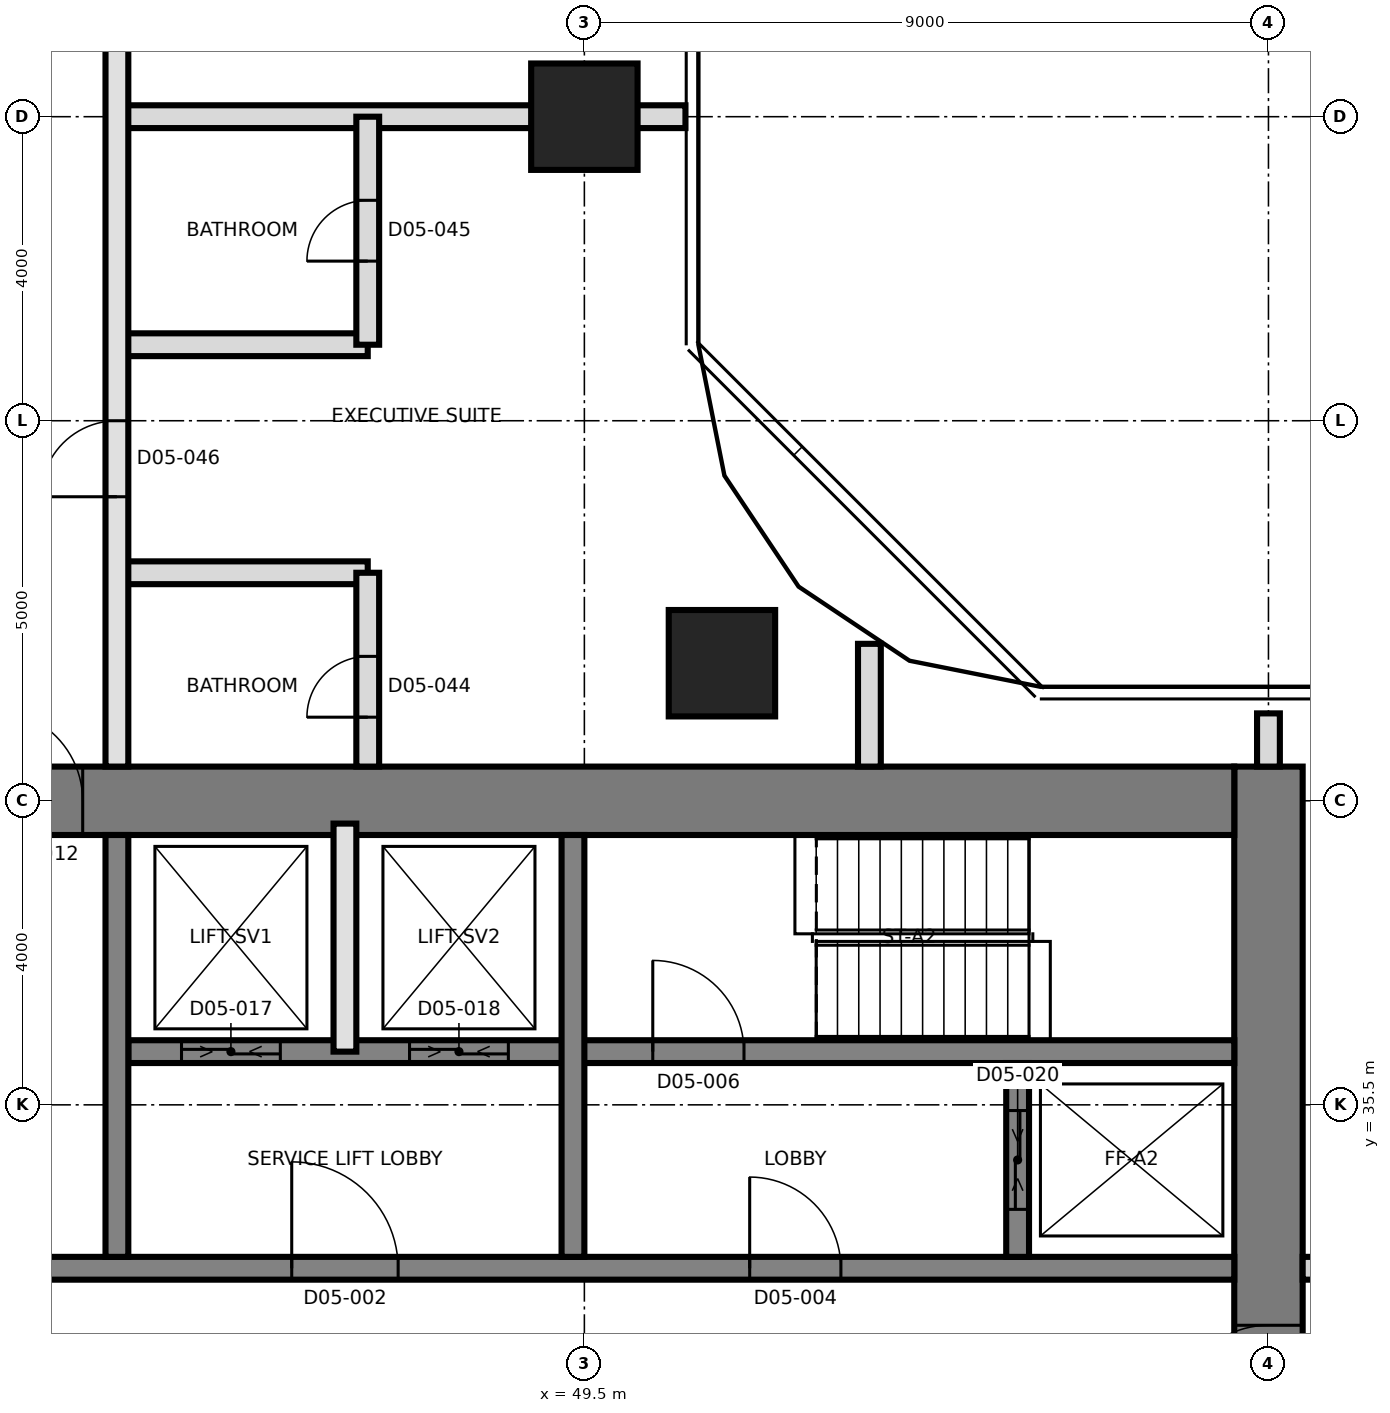
"""IFC4 building model, lengths in metres.
Left out: names, types, materials, properties, quantities, classifications, styles, units other than length and angle.
Written with IfcOpenShell. Run it as: python <this file> out.ifc"""

import sys

from ifc_helpers import new_model, si_unit, direction, frame, frame_2d, origin, origin_2d, place, context, subcontext, project, spatial, rectangle, extrude, element, fill, save


model = new_model("IFC4")
c1 = context("Model", 3, precision=1e-05, world=origin(), true_north=direction((0.0, 1.0)))
c2 = subcontext(c1, "Body", "Model", "MODEL_VIEW")
j1 = project(units=[si_unit("LENGTHUNIT", "METRE"), si_unit("PLANEANGLEUNIT", "RADIAN")], contexts=[c1])
p1 = place(None, origin())
s1 = spatial("IfcSite", under=j1, at=p1, CompositionType="ELEMENT")
p2 = place(p1, origin())
s2 = spatial("IfcBuilding", under=s1, at=p2, CompositionType="ELEMENT")
p3 = place(p2, frame((0.0, 0.0, 74.2)))
s3 = spatial("IfcBuildingStorey", under=s2, at=p3, CompositionType="ELEMENT", Elevation=74.2)
p4 = place(p3, frame((58.5, 21.05, 0.0), z_axis=(0.0, 0.0, 1.0), x_axis=(0.0, 1.0, 0.0)))
e1 = element("IfcWall", 1, at=p4, inside=s3, PredefinedType="SHEAR", context=c2, shape_type="SweptSolid", body=[
    extrude(rectangle(XDim=18.9, YDim=0.9, at=frame_2d((9.45, 0.0))), origin(), (0.0, 0.0, 1.0), 3.7),
])
p5 = place(p4, frame((10.35, 0.0, 0.0)))
e2 = element("IfcOpeningElement", 2, at=p5, cuts=e1, PredefinedType="OPENING", context=c2, shape_type="SweptSolid", body=[
    extrude(rectangle(XDim=1.2, YDim=2.1, at=frame_2d((0.6, 1.05))), frame((0.0, 0.46, 0.0), z_axis=(0.0, -1.0, 0.0), x_axis=(1.0, 0.0, 0.0)), (0.0, 0.0, 1.0), 0.92),
])
p6 = place(p3, frame((31.05, 39.5, 0.0), z_axis=(0.0, 0.0, 1.0), x_axis=(1.0, 0.0, 0.0)))
e3 = element("IfcWall", 3, at=p6, inside=s3, PredefinedType="SHEAR", context=c2, shape_type="SweptSolid", body=[
    extrude(rectangle(XDim=27.0, YDim=0.9, at=frame_2d((13.5, 0.0))), origin(), (0.0, 0.0, 1.0), 3.7),
])
p7 = place(p6, frame((10.65, 0.0, 0.0)))
e4 = element("IfcOpeningElement", 4, at=p7, cuts=e3, PredefinedType="OPENING", context=c2, shape_type="SweptSolid", body=[
    extrude(rectangle(XDim=1.2, YDim=2.1, at=frame_2d((0.6, 1.05))), frame((0.0, 0.46, 0.0), z_axis=(0.0, -1.0, 0.0), x_axis=(1.0, 0.0, 0.0)), (0.0, 0.0, 1.0), 0.92),
])
p8 = place(p3, frame((31.95, 33.35, 0.0), z_axis=(0.0, 0.0, 1.0), x_axis=(1.0, 0.0, 0.0)))
e5 = element("IfcWall", 5, at=p8, inside=s3, PredefinedType="SHEAR", context=c2, shape_type="SweptSolid", body=[
    extrude(rectangle(XDim=26.1, YDim=0.3, at=frame_2d((13.05, 0.0))), origin(), (0.0, 0.0, 1.0), 3.7),
])
p9 = place(p8, frame((13.7, 0.0, 0.0)))
e6 = element("IfcOpeningElement", 6, at=p9, cuts=e5, PredefinedType="OPENING", context=c2, shape_type="SweptSolid", body=[
    extrude(rectangle(XDim=1.4, YDim=2.1, at=frame_2d((0.7, 1.05))), frame((0.0, 0.16, 0.0), z_axis=(0.0, -1.0, 0.0), x_axis=(1.0, 0.0, 0.0)), (0.0, 0.0, 1.0), 0.32),
])
p10 = place(p8, frame((5.175, 0.0, 0.0)))
e7 = element("IfcOpeningElement", 7, at=p10, cuts=e5, PredefinedType="OPENING", context=c2, shape_type="SweptSolid", body=[
    extrude(rectangle(XDim=1.2, YDim=2.1, at=frame_2d((0.6, 1.05))), frame((0.0, 0.16, 0.0), z_axis=(0.0, -1.0, 0.0), x_axis=(1.0, 0.0, 0.0)), (0.0, 0.0, 1.0), 0.32),
])
p11 = place(p8, frame((19.725, 0.0, 0.0)))
e8 = element("IfcOpeningElement", 8, at=p11, cuts=e5, PredefinedType="OPENING", context=c2, shape_type="SweptSolid", body=[
    extrude(rectangle(XDim=1.2, YDim=2.1, at=frame_2d((0.6, 1.05))), frame((0.0, 0.16, 0.0), z_axis=(0.0, -1.0, 0.0), x_axis=(1.0, 0.0, 0.0)), (0.0, 0.0, 1.0), 0.32),
])
p12 = place(p3, frame((43.5, 36.2, 0.0), z_axis=(0.0, 0.0, 1.0), x_axis=(1.0, 0.0, 0.0)))
e9 = element("IfcWall", 9, at=p12, inside=s3, PredefinedType="SHEAR", context=c2, shape_type="SweptSolid", body=[
    extrude(rectangle(XDim=14.55, YDim=0.3, at=frame_2d((7.275, 0.0))), origin(), (0.0, 0.0, 1.0), 3.7),
])
p13 = place(p12, frame((6.9, 0.0, 0.0)))
e10 = element("IfcOpeningElement", 10, at=p13, cuts=e9, PredefinedType="OPENING", context=c2, shape_type="SweptSolid", body=[
    extrude(rectangle(XDim=1.2, YDim=2.1, at=frame_2d((0.6, 1.05))), frame((0.0, 0.16, 0.0), z_axis=(0.0, -1.0, 0.0), x_axis=(1.0, 0.0, 0.0)), (0.0, 0.0, 1.0), 0.32),
])
p14 = place(p12, frame((0.7, 0.0, 0.0)))
e11 = element("IfcOpeningElement", 11, at=p14, cuts=e9, PredefinedType="OPENING", context=c2, shape_type="SweptSolid", body=[
    extrude(rectangle(XDim=1.3, YDim=2.4, at=frame_2d((0.65, 1.2))), frame((0.0, 0.16, 0.0), z_axis=(0.0, -1.0, 0.0), x_axis=(1.0, 0.0, 0.0)), (0.0, 0.0, 1.0), 0.32),
])
p15 = place(p12, frame((3.7, 0.0, 0.0)))
e12 = element("IfcOpeningElement", 12, at=p15, cuts=e9, PredefinedType="OPENING", context=c2, shape_type="SweptSolid", body=[
    extrude(rectangle(XDim=1.3, YDim=2.4, at=frame_2d((0.65, 1.2))), frame((0.0, 0.16, 0.0), z_axis=(0.0, -1.0, 0.0), x_axis=(1.0, 0.0, 0.0)), (0.0, 0.0, 1.0), 0.32),
])
for number, where, z_axis, x_axis in (
    (13, (43.35, 33.5, 0.0), (0.0, 0.0, 1.0), (0.0, 1.0, 0.0)),
    (14, (49.35, 33.5, 0.0), (0.0, 0.0, 1.0), (0.0, 1.0, 0.0)),
):
    element("IfcWall", number, at=place(p3, frame(where, z_axis=z_axis, x_axis=x_axis)), inside=s3, PredefinedType="SHEAR", context=c2, shape_type="SweptSolid", body=[
        extrude(rectangle(XDim=5.55, YDim=0.3, at=frame_2d((2.775, 0.0))), origin(), (0.0, 0.0, 1.0), 3.7),
    ])
p16 = place(p3, frame((55.2, 33.5, 0.0), z_axis=(0.0, 0.0, 1.0), x_axis=(0.0, 1.0, 0.0)))
e15 = element("IfcWall", 15, at=p16, inside=s3, PredefinedType="SHEAR", context=c2, shape_type="SweptSolid", body=[
    extrude(rectangle(XDim=2.55, YDim=0.3, at=frame_2d((1.275, 0.0))), origin(), (0.0, 0.0, 1.0), 3.7),
])
p17 = place(p16, frame((0.625, 0.0, 0.0)))
e16 = element("IfcOpeningElement", 16, at=p17, cuts=e15, PredefinedType="OPENING", context=c2, shape_type="SweptSolid", body=[
    extrude(rectangle(XDim=1.3, YDim=2.4, at=frame_2d((0.65, 1.2))), frame((0.0, 0.16, 0.0), z_axis=(0.0, -1.0, 0.0), x_axis=(1.0, 0.0, 0.0)), (0.0, 0.0, 1.0), 0.32),
])
for number, where, z_axis, x_axis in (
    (17, (51.31, 41.31, 0.0), (0.0, 0.0, 1.0), (1.0, 0.0, 0.0)),
    (18, (49.5, 48.5, 0.0), (0.0, 0.0, 1.0), (1.0, 0.0, 0.0)),
):
    element("IfcColumn", number, at=place(p3, frame(where, z_axis=z_axis, x_axis=x_axis)), inside=s3, PredefinedType="COLUMN", context=c2, shape_type="SweptSolid", body=[
        extrude(rectangle(XDim=1.4, YDim=1.4, at=origin_2d()), origin(), (0.0, 0.0, 1.0), 3.7),
    ])
p18 = place(p3, frame((46.35, 36.2, 0.0), z_axis=(0.0, 0.0, 1.0), x_axis=(0.0, 1.0, 0.0)))
e19 = element("IfcWall", 19, at=p18, inside=s3, PredefinedType="SOLIDWALL", context=c2, shape_type="SweptSolid", body=[
    extrude(rectangle(XDim=3.0, YDim=0.3, at=frame_2d((1.5, 0.0))), origin(), (0.0, 0.0, 1.0), 3.4),
])
p19 = place(p3, frame((58.95, 33.35, 0.0), z_axis=(0.0, 0.0, 1.0), x_axis=(1.0, 0.0, 0.0)))
e20 = element("IfcWall", 20, at=p19, inside=s3, PredefinedType="PARTITIONING", context=c2, shape_type="SweptSolid", body=[
    extrude(rectangle(XDim=26.38, YDim=0.3, at=frame_2d((13.19, 0.0))), origin(), (0.0, 0.0, 1.0), 3.4),
])
p20 = place(p19, frame((0.685, 0.0, 0.0)))
e21 = element("IfcOpeningElement", 21, at=p20, cuts=e20, PredefinedType="OPENING", context=c2, shape_type="SweptSolid", body=[
    extrude(rectangle(XDim=1.2, YDim=2.1, at=frame_2d((0.6, 1.05))), frame((0.0, 0.16, 0.0), z_axis=(0.0, -1.0, 0.0), x_axis=(1.0, 0.0, 0.0)), (0.0, 0.0, 1.0), 0.32),
])
p21 = place(p19, frame((3.935, 0.0, 0.0)))
e22 = element("IfcOpeningElement", 22, at=p21, cuts=e20, PredefinedType="OPENING", context=c2, shape_type="SweptSolid", body=[
    extrude(rectangle(XDim=1.0, YDim=2.1, at=frame_2d((0.5, 1.05))), frame((0.0, 0.16, 0.0), z_axis=(0.0, -1.0, 0.0), x_axis=(1.0, 0.0, 0.0)), (0.0, 0.0, 1.0), 0.32),
])
p22 = place(p19, frame((9.58, 0.0, 0.0)))
e23 = element("IfcOpeningElement", 23, at=p22, cuts=e20, PredefinedType="OPENING", context=c2, shape_type="SweptSolid", body=[
    extrude(rectangle(XDim=1.0, YDim=2.1, at=frame_2d((0.5, 1.05))), frame((0.0, 0.16, 0.0), z_axis=(0.0, -1.0, 0.0), x_axis=(1.0, 0.0, 0.0)), (0.0, 0.0, 1.0), 0.32),
])
p23 = place(p19, frame((15.43, 0.0, 0.0)))
e24 = element("IfcOpeningElement", 24, at=p23, cuts=e20, PredefinedType="OPENING", context=c2, shape_type="SweptSolid", body=[
    extrude(rectangle(XDim=1.0, YDim=2.1, at=frame_2d((0.5, 1.05))), frame((0.0, 0.16, 0.0), z_axis=(0.0, -1.0, 0.0), x_axis=(1.0, 0.0, 0.0)), (0.0, 0.0, 1.0), 0.32),
])
p24 = place(p19, frame((21.55, 0.0, 0.0)))
e25 = element("IfcOpeningElement", 25, at=p24, cuts=e20, PredefinedType="OPENING", context=c2, shape_type="SweptSolid", body=[
    extrude(rectangle(XDim=1.0, YDim=2.4, at=frame_2d((0.5, 1.2))), frame((0.0, 0.16, 0.0), z_axis=(0.0, -1.0, 0.0), x_axis=(1.0, 0.0, 0.0)), (0.0, 0.0, 1.0), 0.32),
])
for number, where, z_axis, x_axis in (
    (26, (43.35, 42.5, 0.0), (0.0, 0.0, 1.0), (1.0, 0.0, 0.0)),
    (27, (43.35, 45.5, 0.0), (0.0, 0.0, 1.0), (1.0, 0.0, 0.0)),
):
    element("IfcWall", number, at=place(p3, frame(where, z_axis=z_axis, x_axis=x_axis)), inside=s3, PredefinedType="PARTITIONING", context=c2, shape_type="SweptSolid", body=[
        extrude(rectangle(XDim=3.3, YDim=0.3, at=frame_2d((1.65, 0.0))), origin(), (0.0, 0.0, 1.0), 3.4),
    ])
p25 = place(p3, frame((43.35, 48.5, 0.0), z_axis=(0.0, 0.0, 1.0), x_axis=(1.0, 0.0, 0.0)))
e28 = element("IfcWall", 28, at=p25, inside=s3, PredefinedType="PARTITIONING", context=c2, shape_type="SweptSolid", body=[
    extrude(rectangle(XDim=7.48, YDim=0.3, at=frame_2d((3.74, 0.0))), origin(), (0.0, 0.0, 1.0), 3.4),
])
p26 = place(p3, frame((43.35, 39.95, 0.0), z_axis=(0.0, 0.0, 1.0), x_axis=(0.0, 1.0, 0.0)))
e29 = element("IfcWall", 29, at=p26, inside=s3, PredefinedType="SOLIDWALL", context=c2, shape_type="SweptSolid", body=[
    extrude(rectangle(XDim=25.85, YDim=0.3, at=frame_2d((12.925, 0.0))), origin(), (0.0, 0.0, 1.0), 3.4),
])
p27 = place(p26, frame((3.55, 0.0, 0.0)))
e30 = element("IfcOpeningElement", 30, at=p27, cuts=e29, PredefinedType="OPENING", context=c2, shape_type="SweptSolid", body=[
    extrude(rectangle(XDim=1.0, YDim=2.4, at=frame_2d((0.5, 1.2))), frame((0.0, 0.16, 0.0), z_axis=(0.0, -1.0, 0.0), x_axis=(1.0, 0.0, 0.0)), (0.0, 0.0, 1.0), 0.32),
])
p28 = place(p26, frame((9.7, 0.0, 0.0)))
e31 = element("IfcOpeningElement", 31, at=p28, cuts=e29, PredefinedType="OPENING", context=c2, shape_type="SweptSolid", body=[
    extrude(rectangle(XDim=1.0, YDim=2.1, at=frame_2d((0.5, 1.05))), frame((0.0, 0.16, 0.0), z_axis=(0.0, -1.0, 0.0), x_axis=(1.0, 0.0, 0.0)), (0.0, 0.0, 1.0), 0.32),
])
p29 = place(p26, frame((15.55, 0.0, 0.0)))
e32 = element("IfcOpeningElement", 32, at=p29, cuts=e29, PredefinedType="OPENING", context=c2, shape_type="SweptSolid", body=[
    extrude(rectangle(XDim=1.0, YDim=2.1, at=frame_2d((0.5, 1.05))), frame((0.0, 0.16, 0.0), z_axis=(0.0, -1.0, 0.0), x_axis=(1.0, 0.0, 0.0)), (0.0, 0.0, 1.0), 0.32),
])
p30 = place(p26, frame((21.1, 0.0, 0.0)))
e33 = element("IfcOpeningElement", 33, at=p30, cuts=e29, PredefinedType="OPENING", context=c2, shape_type="SweptSolid", body=[
    extrude(rectangle(XDim=1.0, YDim=2.4, at=frame_2d((0.5, 1.2))), frame((0.0, 0.16, 0.0), z_axis=(0.0, -1.0, 0.0), x_axis=(1.0, 0.0, 0.0)), (0.0, 0.0, 1.0), 0.32),
])
p31 = place(p3, frame((46.65, 39.95, 0.0), z_axis=(0.0, 0.0, 1.0), x_axis=(0.0, 1.0, 0.0)))
e34 = element("IfcWall", 34, at=p31, inside=s3, PredefinedType="PARTITIONING", context=c2, shape_type="SweptSolid", body=[
    extrude(rectangle(XDim=2.55, YDim=0.3, at=frame_2d((1.275, 0.0))), origin(), (0.0, 0.0, 1.0), 3.4),
])
p32 = place(p31, frame((0.65, 0.0, 0.0)))
e35 = element("IfcOpeningElement", 35, at=p32, cuts=e34, PredefinedType="OPENING", context=c2, shape_type="SweptSolid", body=[
    extrude(rectangle(XDim=0.8, YDim=2.1, at=frame_2d((0.4, 1.05))), frame((0.0, 0.16, 0.0), z_axis=(0.0, -1.0, 0.0), x_axis=(1.0, 0.0, 0.0)), (0.0, 0.0, 1.0), 0.32),
])
p33 = place(p3, frame((46.65, 45.5, 0.0), z_axis=(0.0, 0.0, 1.0), x_axis=(0.0, 1.0, 0.0)))
e36 = element("IfcWall", 36, at=p33, inside=s3, PredefinedType="PARTITIONING", context=c2, shape_type="SweptSolid", body=[
    extrude(rectangle(XDim=3.0, YDim=0.3, at=frame_2d((1.5, 0.0))), origin(), (0.0, 0.0, 1.0), 3.4),
])
p34 = place(p33, frame((1.1, 0.0, 0.0)))
e37 = element("IfcOpeningElement", 37, at=p34, cuts=e36, PredefinedType="OPENING", context=c2, shape_type="SweptSolid", body=[
    extrude(rectangle(XDim=0.8, YDim=2.1, at=frame_2d((0.4, 1.05))), frame((0.0, 0.16, 0.0), z_axis=(0.0, -1.0, 0.0), x_axis=(1.0, 0.0, 0.0)), (0.0, 0.0, 1.0), 0.32),
])
p35 = place(p3, frame((53.25, 39.95, 0.0), z_axis=(0.0, 0.0, 1.0), x_axis=(0.0, 1.0, 0.0)))
e38 = element("IfcWall", 38, at=p35, inside=s3, PredefinedType="PARTITIONING", context=c2, shape_type="SweptSolid", body=[
    extrude(rectangle(XDim=1.615, YDim=0.3, at=frame_2d((0.808, 0.0))), origin(), (0.0, 0.0, 1.0), 3.4),
])
p36 = place(p3, frame((58.5, 39.95, 0.0), z_axis=(0.0, 0.0, 1.0), x_axis=(0.0, 1.0, 0.0)))
e39 = element("IfcWall", 39, at=p36, inside=s3, PredefinedType="PARTITIONING", context=c2, shape_type="SweptSolid", body=[
    extrude(rectangle(XDim=0.7, YDim=0.3, at=frame_2d((0.35, 0.0))), origin(), (0.0, 0.0, 1.0), 3.4),
])
p37 = place(p9, origin())
e40 = element("IfcDoor", 40, at=p37, inside=s3, OperationType="SINGLE_SWING_RIGHT", PredefinedType="DOOR", context=c2, shape_type="SweptSolid", body=[
    extrude(rectangle(XDim=1.4, YDim=2.1, at=frame_2d((0.7, 1.05))), frame((0.0, 0.025, 0.0), z_axis=(0.0, -1.0, 0.0), x_axis=(1.0, 0.0, 0.0)), (0.0, 0.0, 1.0), 0.05),
])
fill(e6, e40)
p38 = place(p11, origin())
e41 = element("IfcDoor", 41, at=p38, inside=s3, OperationType="SINGLE_SWING_RIGHT", PredefinedType="DOOR", context=c2, shape_type="SweptSolid", body=[
    extrude(rectangle(XDim=1.2, YDim=2.1, at=frame_2d((0.6, 1.05))), frame((0.0, 0.025, 0.0), z_axis=(0.0, -1.0, 0.0), x_axis=(1.0, 0.0, 0.0)), (0.0, 0.0, 1.0), 0.05),
])
fill(e8, e41)
p39 = place(p13, origin())
e42 = element("IfcDoor", 42, at=p39, inside=s3, OperationType="SINGLE_SWING_LEFT", PredefinedType="DOOR", context=c2, shape_type="SweptSolid", body=[
    extrude(rectangle(XDim=1.2, YDim=2.1, at=frame_2d((0.6, 1.05))), frame((0.0, 0.025, 0.0), z_axis=(0.0, -1.0, 0.0), x_axis=(1.0, 0.0, 0.0)), (0.0, 0.0, 1.0), 0.05),
])
fill(e10, e42)
p40 = place(p5, origin())
e43 = element("IfcDoor", 43, at=p40, inside=s3, OperationType="SINGLE_SWING_LEFT", PredefinedType="DOOR", context=c2, shape_type="SweptSolid", body=[
    extrude(rectangle(XDim=1.2, YDim=2.1, at=frame_2d((0.6, 1.05))), frame((0.0, 0.025, 0.0), z_axis=(0.0, -1.0, 0.0), x_axis=(1.0, 0.0, 0.0)), (0.0, 0.0, 1.0), 0.05),
])
fill(e2, e43)
p41 = place(p7, origin())
e44 = element("IfcDoor", 44, at=p41, inside=s3, OperationType="SINGLE_SWING_RIGHT", PredefinedType="DOOR", context=c2, shape_type="SweptSolid", body=[
    extrude(rectangle(XDim=1.2, YDim=2.1, at=frame_2d((0.6, 1.05))), frame((0.0, 0.025, 0.0), z_axis=(0.0, -1.0, 0.0), x_axis=(1.0, 0.0, 0.0)), (0.0, 0.0, 1.0), 0.05),
])
fill(e4, e44)
p42 = place(p14, origin())
e45 = element("IfcDoor", 45, at=p42, inside=s3, OperationType="SLIDING_TO_LEFT", PredefinedType="DOOR", context=c2, shape_type="SweptSolid", body=[
    extrude(rectangle(XDim=1.3, YDim=2.4, at=frame_2d((0.65, 1.2))), frame((0.0, 0.025, 0.0), z_axis=(0.0, -1.0, 0.0), x_axis=(1.0, 0.0, 0.0)), (0.0, 0.0, 1.0), 0.05),
])
fill(e11, e45)
p43 = place(p15, origin())
e46 = element("IfcDoor", 46, at=p43, inside=s3, OperationType="SLIDING_TO_LEFT", PredefinedType="DOOR", context=c2, shape_type="SweptSolid", body=[
    extrude(rectangle(XDim=1.3, YDim=2.4, at=frame_2d((0.65, 1.2))), frame((0.0, 0.025, 0.0), z_axis=(0.0, -1.0, 0.0), x_axis=(1.0, 0.0, 0.0)), (0.0, 0.0, 1.0), 0.05),
])
fill(e12, e46)
p44 = place(p17, origin())
e47 = element("IfcDoor", 47, at=p44, inside=s3, OperationType="SLIDING_TO_LEFT", PredefinedType="DOOR", context=c2, shape_type="SweptSolid", body=[
    extrude(rectangle(XDim=1.3, YDim=2.4, at=frame_2d((0.65, 1.2))), frame((0.0, 0.025, 0.0), z_axis=(0.0, -1.0, 0.0), x_axis=(1.0, 0.0, 0.0)), (0.0, 0.0, 1.0), 0.05),
])
fill(e16, e47)
p45 = place(p32, origin())
e48 = element("IfcDoor", 48, at=p45, inside=s3, OperationType="SINGLE_SWING_LEFT", PredefinedType="DOOR", context=c2, shape_type="SweptSolid", body=[
    extrude(rectangle(XDim=0.8, YDim=2.1, at=frame_2d((0.4, 1.05))), frame((0.0, 0.025, 0.0), z_axis=(0.0, -1.0, 0.0), x_axis=(1.0, 0.0, 0.0)), (0.0, 0.0, 1.0), 0.05),
])
fill(e35, e48)
p46 = place(p34, origin())
e49 = element("IfcDoor", 49, at=p46, inside=s3, OperationType="SINGLE_SWING_RIGHT", PredefinedType="DOOR", context=c2, shape_type="SweptSolid", body=[
    extrude(rectangle(XDim=0.8, YDim=2.1, at=frame_2d((0.4, 1.05))), frame((0.0, 0.025, 0.0), z_axis=(0.0, -1.0, 0.0), x_axis=(1.0, 0.0, 0.0)), (0.0, 0.0, 1.0), 0.05),
])
fill(e37, e49)
p47 = place(p27, origin())
e50 = element("IfcDoor", 50, at=p47, inside=s3, OperationType="SINGLE_SWING_LEFT", PredefinedType="DOOR", context=c2, shape_type="SweptSolid", body=[
    extrude(rectangle(XDim=1.0, YDim=2.4, at=frame_2d((0.5, 1.2))), frame((0.0, 0.025, 0.0), z_axis=(0.0, -1.0, 0.0), x_axis=(1.0, 0.0, 0.0)), (0.0, 0.0, 1.0), 0.05),
])
fill(e30, e50)
save(model, sys.argv[1])
